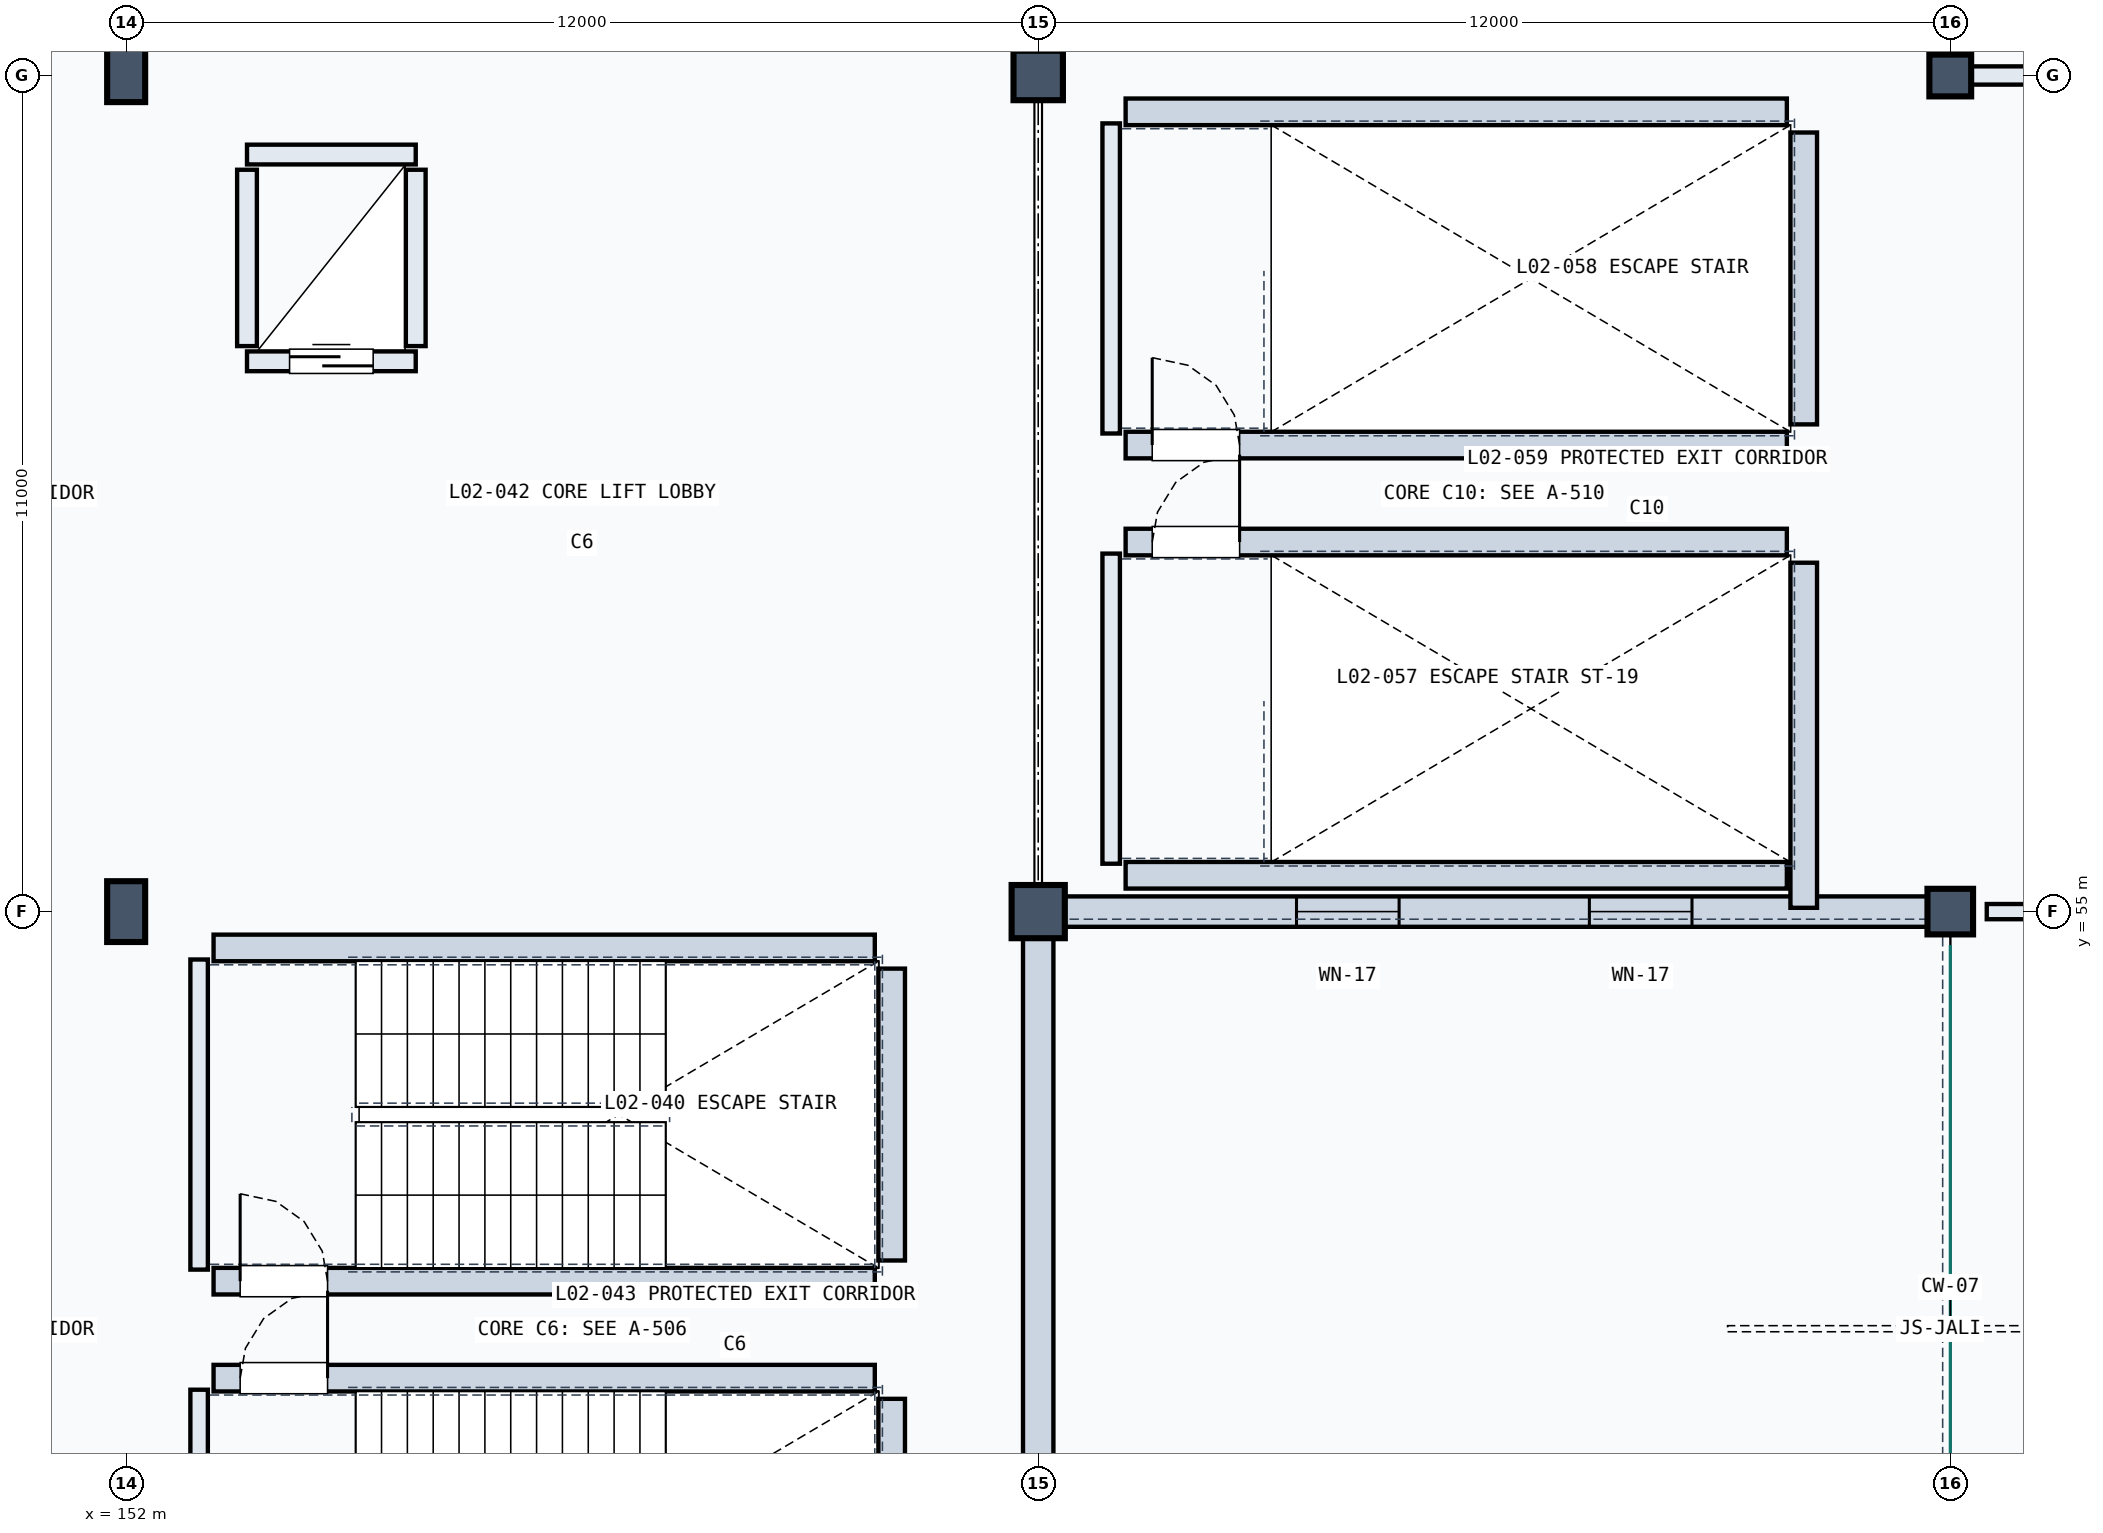
"""IFC4 building model, lengths in metres.
Left out: names, types, materials, properties, quantities, classifications, styles, units other than length and angle.
Written with IfcOpenShell. Run it as: python <this file> out.ifc"""

import sys

from ifc_helpers import new_model, si_unit, direction, frame, frame_2d, origin, origin_2d, place, context, subcontext, project, spatial, rectangle, extrude, element, fill, save


model = new_model("IFC4")
c1 = context("Model", 3, precision=1e-05, world=origin(), true_north=direction((0.0, 1.0)))
c2 = subcontext(c1, "Body", "Model", "MODEL_VIEW")
j1 = project(units=[si_unit("LENGTHUNIT", "METRE"), si_unit("PLANEANGLEUNIT", "RADIAN")], contexts=[c1])
p1 = place(None, origin())
s1 = spatial("IfcSite", under=j1, at=p1, CompositionType="ELEMENT")
p2 = place(p1, origin())
s2 = spatial("IfcBuilding", under=s1, at=p2, CompositionType="ELEMENT")
p3 = place(p2, frame((0.0, 0.0, 10.2)))
s3 = spatial("IfcBuildingStorey", under=s2, at=p3, CompositionType="ELEMENT", Elevation=10.2)
p4 = place(p3, frame((152.0, 55.0, 0.0), z_axis=(0.0, 0.0, 1.0), x_axis=(1.0, 0.0, 0.0)))
e1 = element("IfcColumn", 1, at=p4, inside=s3, PredefinedType="COLUMN", context=c2, shape_type="SweptSolid", body=[
    extrude(rectangle(XDim=0.5, YDim=0.8, at=origin_2d()), origin(), (0.0, 0.0, 1.0), 4.5),
])
p5 = place(p3, frame((152.0, 66.0, 0.0), z_axis=(0.0, 0.0, 1.0), x_axis=(1.0, 0.0, 0.0)))
e2 = element("IfcColumn", 2, at=p5, inside=s3, PredefinedType="COLUMN", context=c2, shape_type="SweptSolid", body=[
    extrude(rectangle(XDim=0.5, YDim=0.7, at=origin_2d()), origin(), (0.0, 0.0, 1.0), 4.5),
])
p6 = place(p3, frame((164.0, 55.0, 0.0), z_axis=(0.0, 0.0, 1.0), x_axis=(1.0, 0.0, 0.0)))
e3 = element("IfcColumn", 3, at=p6, inside=s3, PredefinedType="COLUMN", context=c2, shape_type="SweptSolid", body=[
    extrude(rectangle(XDim=0.7, YDim=0.7, at=origin_2d()), origin(), (0.0, 0.0, 1.0), 4.5),
])
p7 = place(p3, frame((164.0, 66.0, 0.0), z_axis=(0.0, 0.0, 1.0), x_axis=(1.0, 0.0, 0.0)))
e4 = element("IfcColumn", 4, at=p7, inside=s3, PredefinedType="COLUMN", context=c2, shape_type="SweptSolid", body=[
    extrude(rectangle(XDim=0.65, YDim=0.65, at=origin_2d()), origin(), (0.0, 0.0, 1.0), 4.5),
])
p8 = place(p3, frame((176.0, 55.0, 0.0), z_axis=(0.0, 0.0, 1.0), x_axis=(1.0, 0.0, 0.0)))
e5 = element("IfcColumn", 5, at=p8, inside=s3, PredefinedType="COLUMN", context=c2, shape_type="SweptSolid", body=[
    extrude(rectangle(XDim=0.6, YDim=0.6, at=origin_2d()), origin(), (0.0, 0.0, 1.0), 4.5),
])
p9 = place(p3, frame((176.0, 66.0, 0.0), z_axis=(0.0, 0.0, 1.0), x_axis=(1.0, 0.0, 0.0)))
e6 = element("IfcColumn", 6, at=p9, inside=s3, PredefinedType="COLUMN", context=c2, shape_type="SweptSolid", body=[
    extrude(rectangle(XDim=0.55, YDim=0.55, at=origin_2d()), origin(), (0.0, 0.0, 1.0), 4.5),
])
p10 = place(p3, frame((164.0, 44.22, 0.0), z_axis=(0.0, 0.0, 1.0), x_axis=(0.0, 1.0, 0.0)))
e7 = element("IfcWall", 7, at=p10, inside=s3, PredefinedType="SOLIDWALL", context=c2, shape_type="SweptSolid", body=[
    extrude(rectangle(XDim=10.56, YDim=0.4, at=frame_2d((5.28, 0.0))), origin(), (0.0, 0.0, 1.0), 3.19),
])
p11 = place(p3, frame((164.22, 55.0, 0.0), z_axis=(0.0, 0.0, 1.0), x_axis=(1.0, 0.0, 0.0)))
e8 = element("IfcWall", 8, at=p11, inside=s3, PredefinedType="SOLIDWALL", context=c2, shape_type="SweptSolid", body=[
    extrude(rectangle(XDim=11.56, YDim=0.4, at=frame_2d((5.78, 0.0))), origin(), (0.0, 0.0, 1.0), 3.29),
])
p12 = place(p11, frame((3.178, 0.0, 0.8)))
e9 = element("IfcOpeningElement", 9, at=p12, cuts=e8, PredefinedType="OPENING", context=c2, shape_type="SweptSolid", body=[
    extrude(rectangle(XDim=1.35, YDim=2.1, at=frame_2d((0.675, 1.05))), frame((0.0, 0.21, 0.0), z_axis=(0.0, -1.0, 0.0), x_axis=(1.0, 0.0, 0.0)), (0.0, 0.0, 1.0), 0.42),
])
p13 = place(p11, frame((7.032, 0.0, 0.8)))
e10 = element("IfcOpeningElement", 10, at=p13, cuts=e8, PredefinedType="OPENING", context=c2, shape_type="SweptSolid", body=[
    extrude(rectangle(XDim=1.35, YDim=2.1, at=frame_2d((0.675, 1.05))), frame((0.0, 0.21, 0.0), z_axis=(0.0, -1.0, 0.0), x_axis=(1.0, 0.0, 0.0)), (0.0, 0.0, 1.0), 0.42),
])
p14 = place(p3, frame((152.96, 44.63, 0.0), z_axis=(0.0, 0.0, 1.0), x_axis=(0.0, 1.0, 0.0)))
e11 = element("IfcWall", 11, at=p14, inside=s3, PredefinedType="SOLIDWALL", context=c2, shape_type="SweptSolid", body=[
    extrude(rectangle(XDim=4.08, YDim=0.23, at=frame_2d((2.04, 0.0))), origin(), (0.0, 0.0, 1.0), 4.14),
])
p15 = place(p3, frame((162.072, 44.05, 0.0), z_axis=(0.0, 0.0, 1.0), x_axis=(0.0, 1.0, 0.0)))
e12 = element("IfcWall", 12, at=p15, inside=s3, PredefinedType="SOLIDWALL", context=c2, shape_type="SweptSolid", body=[
    extrude(rectangle(XDim=4.54, YDim=0.35, at=frame_2d((2.27, 0.0))), origin(), (0.0, 0.0, 1.0), 4.14),
])
p16 = place(p3, frame((153.15, 48.862, 0.0), z_axis=(0.0, 0.0, 1.0), x_axis=(1.0, 0.0, 0.0)))
e13 = element("IfcWall", 13, at=p16, inside=s3, PredefinedType="SOLIDWALL", context=c2, shape_type="SweptSolid", body=[
    extrude(rectangle(XDim=8.7, YDim=0.35, at=frame_2d((4.35, 0.0))), origin(), (0.0, 0.0, 1.0), 4.14),
])
p17 = place(p16, frame((0.35, 0.0, 0.0)))
e14 = element("IfcOpeningElement", 14, at=p17, cuts=e13, PredefinedType="OPENING", context=c2, shape_type="SweptSolid", body=[
    extrude(rectangle(XDim=1.15, YDim=2.2, at=frame_2d((0.575, 1.1))), frame((0.0, 0.185, 0.0), z_axis=(0.0, -1.0, 0.0), x_axis=(1.0, 0.0, 0.0)), (0.0, 0.0, 1.0), 0.37),
])
p18 = place(p3, frame((152.96, 50.29, 0.0), z_axis=(0.0, 0.0, 1.0), x_axis=(0.0, 1.0, 0.0)))
e15 = element("IfcWall", 15, at=p18, inside=s3, PredefinedType="SOLIDWALL", context=c2, shape_type="SweptSolid", body=[
    extrude(rectangle(XDim=4.08, YDim=0.23, at=frame_2d((2.04, 0.0))), origin(), (0.0, 0.0, 1.0), 4.14),
])
p19 = place(p3, frame((162.072, 50.41, 0.0), z_axis=(0.0, 0.0, 1.0), x_axis=(0.0, 1.0, 0.0)))
e16 = element("IfcWall", 16, at=p19, inside=s3, PredefinedType="SOLIDWALL", context=c2, shape_type="SweptSolid", body=[
    extrude(rectangle(XDim=3.84, YDim=0.35, at=frame_2d((1.92, 0.0))), origin(), (0.0, 0.0, 1.0), 4.14),
])
p20 = place(p3, frame((153.15, 50.138, 0.0), z_axis=(0.0, 0.0, 1.0), x_axis=(1.0, 0.0, 0.0)))
e17 = element("IfcWall", 17, at=p20, inside=s3, PredefinedType="SOLIDWALL", context=c2, shape_type="SweptSolid", body=[
    extrude(rectangle(XDim=8.7, YDim=0.35, at=frame_2d((4.35, 0.0))), origin(), (0.0, 0.0, 1.0), 4.14),
])
p21 = place(p20, frame((0.35, 0.0, 0.0)))
e18 = element("IfcOpeningElement", 18, at=p21, cuts=e17, PredefinedType="OPENING", context=c2, shape_type="SweptSolid", body=[
    extrude(rectangle(XDim=1.15, YDim=2.2, at=frame_2d((0.575, 1.1))), frame((0.0, 0.185, 0.0), z_axis=(0.0, -1.0, 0.0), x_axis=(1.0, 0.0, 0.0)), (0.0, 0.0, 1.0), 0.37),
])
p22 = place(p3, frame((153.15, 54.522, 0.0), z_axis=(0.0, 0.0, 1.0), x_axis=(1.0, 0.0, 0.0)))
e19 = element("IfcWall", 19, at=p22, inside=s3, PredefinedType="SOLIDWALL", context=c2, shape_type="SweptSolid", body=[
    extrude(rectangle(XDim=8.7, YDim=0.35, at=frame_2d((4.35, 0.0))), origin(), (0.0, 0.0, 1.0), 4.14),
])
p23 = place(p3, frame((153.59, 62.24, 0.0), z_axis=(0.0, 0.0, 1.0), x_axis=(1.0, 0.0, 0.0)))
e20 = element("IfcWall", 20, at=p23, inside=s3, PredefinedType="SOLIDWALL", context=c2, shape_type="SweptSolid", body=[
    extrude(rectangle(XDim=2.22, YDim=0.26, at=frame_2d((1.11, 0.0))), origin(), (0.0, 0.0, 1.0), 4.14),
])
p24 = place(p23, frame((0.56, 0.0, 0.0)))
e21 = element("IfcOpeningElement", 21, at=p24, cuts=e20, PredefinedType="OPENING", context=c2, shape_type="SweptSolid", body=[
    extrude(rectangle(XDim=1.1, YDim=2.15, at=frame_2d((0.55, 1.075))), frame((0.0, 0.14, 0.0), z_axis=(0.0, -1.0, 0.0), x_axis=(1.0, 0.0, 0.0)), (0.0, 0.0, 1.0), 0.28),
])
p25 = place(p3, frame((153.59, 64.96, 0.0), z_axis=(0.0, 0.0, 1.0), x_axis=(1.0, 0.0, 0.0)))
e22 = element("IfcWall", 22, at=p25, inside=s3, PredefinedType="SOLIDWALL", context=c2, shape_type="SweptSolid", body=[
    extrude(rectangle(XDim=2.22, YDim=0.26, at=frame_2d((1.11, 0.0))), origin(), (0.0, 0.0, 1.0), 4.14),
])
for number, where, z_axis, x_axis in (
    (23, (153.59, 62.44, 0.0), (0.0, 0.0, 1.0), (0.0, 1.0, 0.0)),
    (24, (155.81, 62.44, 0.0), (0.0, 0.0, 1.0), (0.0, 1.0, 0.0)),
):
    element("IfcWall", number, at=place(p3, frame(where, z_axis=z_axis, x_axis=x_axis)), inside=s3, PredefinedType="SOLIDWALL", context=c2, shape_type="SweptSolid", body=[
        extrude(rectangle(XDim=2.32, YDim=0.26, at=frame_2d((1.16, 0.0))), origin(), (0.0, 0.0, 1.0), 4.14),
    ])
p26 = place(p3, frame((164.96, 55.63, 0.0), z_axis=(0.0, 0.0, 1.0), x_axis=(0.0, 1.0, 0.0)))
e25 = element("IfcWall", 25, at=p26, inside=s3, PredefinedType="SOLIDWALL", context=c2, shape_type="SweptSolid", body=[
    extrude(rectangle(XDim=4.08, YDim=0.23, at=frame_2d((2.04, 0.0))), origin(), (0.0, 0.0, 1.0), 4.14),
])
p27 = place(p3, frame((174.072, 55.05, 0.0), z_axis=(0.0, 0.0, 1.0), x_axis=(0.0, 1.0, 0.0)))
e26 = element("IfcWall", 26, at=p27, inside=s3, PredefinedType="SOLIDWALL", context=c2, shape_type="SweptSolid", body=[
    extrude(rectangle(XDim=4.54, YDim=0.35, at=frame_2d((2.27, 0.0))), origin(), (0.0, 0.0, 1.0), 4.14),
])
p28 = place(p3, frame((165.15, 55.478, 0.0), z_axis=(0.0, 0.0, 1.0), x_axis=(1.0, 0.0, 0.0)))
e27 = element("IfcWall", 27, at=p28, inside=s3, PredefinedType="SOLIDWALL", context=c2, shape_type="SweptSolid", body=[
    extrude(rectangle(XDim=8.7, YDim=0.35, at=frame_2d((4.35, 0.0))), origin(), (0.0, 0.0, 1.0), 4.14),
])
p29 = place(p3, frame((165.15, 59.862, 0.0), z_axis=(0.0, 0.0, 1.0), x_axis=(1.0, 0.0, 0.0)))
e28 = element("IfcWall", 28, at=p29, inside=s3, PredefinedType="SOLIDWALL", context=c2, shape_type="SweptSolid", body=[
    extrude(rectangle(XDim=8.7, YDim=0.35, at=frame_2d((4.35, 0.0))), origin(), (0.0, 0.0, 1.0), 4.14),
])
p30 = place(p29, frame((0.35, 0.0, 0.0)))
e29 = element("IfcOpeningElement", 29, at=p30, cuts=e28, PredefinedType="OPENING", context=c2, shape_type="SweptSolid", body=[
    extrude(rectangle(XDim=1.15, YDim=2.2, at=frame_2d((0.575, 1.1))), frame((0.0, 0.185, 0.0), z_axis=(0.0, -1.0, 0.0), x_axis=(1.0, 0.0, 0.0)), (0.0, 0.0, 1.0), 0.37),
])
p31 = place(p3, frame((164.96, 61.29, 0.0), z_axis=(0.0, 0.0, 1.0), x_axis=(0.0, 1.0, 0.0)))
e30 = element("IfcWall", 30, at=p31, inside=s3, PredefinedType="SOLIDWALL", context=c2, shape_type="SweptSolid", body=[
    extrude(rectangle(XDim=4.08, YDim=0.23, at=frame_2d((2.04, 0.0))), origin(), (0.0, 0.0, 1.0), 4.14),
])
p32 = place(p3, frame((174.072, 61.41, 0.0), z_axis=(0.0, 0.0, 1.0), x_axis=(0.0, 1.0, 0.0)))
e31 = element("IfcWall", 31, at=p32, inside=s3, PredefinedType="SOLIDWALL", context=c2, shape_type="SweptSolid", body=[
    extrude(rectangle(XDim=3.84, YDim=0.35, at=frame_2d((1.92, 0.0))), origin(), (0.0, 0.0, 1.0), 4.14),
])
p33 = place(p3, frame((165.15, 61.138, 0.0), z_axis=(0.0, 0.0, 1.0), x_axis=(1.0, 0.0, 0.0)))
e32 = element("IfcWall", 32, at=p33, inside=s3, PredefinedType="SOLIDWALL", context=c2, shape_type="SweptSolid", body=[
    extrude(rectangle(XDim=8.7, YDim=0.35, at=frame_2d((4.35, 0.0))), origin(), (0.0, 0.0, 1.0), 4.14),
])
p34 = place(p33, frame((0.35, 0.0, 0.0)))
e33 = element("IfcOpeningElement", 33, at=p34, cuts=e32, PredefinedType="OPENING", context=c2, shape_type="SweptSolid", body=[
    extrude(rectangle(XDim=1.15, YDim=2.2, at=frame_2d((0.575, 1.1))), frame((0.0, 0.185, 0.0), z_axis=(0.0, -1.0, 0.0), x_axis=(1.0, 0.0, 0.0)), (0.0, 0.0, 1.0), 0.37),
])
p35 = place(p3, frame((165.15, 65.522, 0.0), z_axis=(0.0, 0.0, 1.0), x_axis=(1.0, 0.0, 0.0)))
e34 = element("IfcWall", 34, at=p35, inside=s3, PredefinedType="SOLIDWALL", context=c2, shape_type="SweptSolid", body=[
    extrude(rectangle(XDim=8.7, YDim=0.35, at=frame_2d((4.35, 0.0))), origin(), (0.0, 0.0, 1.0), 4.14),
])
p36 = place(p3, frame((176.48, 55.0, 0.0), z_axis=(0.0, 0.0, 1.0), x_axis=(1.0, 0.0, 0.0)))
e35 = element("IfcWall", 35, at=p36, inside=s3, PredefinedType="PARTITIONING", context=c2, shape_type="SweptSolid", body=[
    extrude(rectangle(XDim=10.04, YDim=0.2, at=frame_2d((5.02, 0.0))), origin(), (0.0, 0.0, 1.0), 4.14),
])
p37 = place(p36, frame((4.55, 0.0, 0.0)))
e36 = element("IfcOpeningElement", 36, at=p37, cuts=e35, PredefinedType="OPENING", context=c2, shape_type="SweptSolid", body=[
    extrude(rectangle(XDim=0.94, YDim=2.15, at=frame_2d((0.47, 1.075))), frame((0.0, 0.11, 0.0), z_axis=(0.0, -1.0, 0.0), x_axis=(1.0, 0.0, 0.0)), (0.0, 0.0, 1.0), 0.22),
])
p38 = place(p3, frame((176.22, 66.0, 0.0), z_axis=(0.0, 0.0, 1.0), x_axis=(1.0, 0.0, 0.0)))
e37 = element("IfcWall", 37, at=p38, inside=s3, PredefinedType="PARTITIONING", context=c2, shape_type="SweptSolid", body=[
    extrude(rectangle(XDim=10.3, YDim=0.24, at=frame_2d((5.15, 0.0))), origin(), (0.0, 0.0, 1.0), 4.14),
])
p39 = place(p12, origin())
e38 = element("IfcWindow", 38, at=p39, inside=s3, PartitioningType="SINGLE_PANEL", PredefinedType="WINDOW", context=c2, shape_type="SweptSolid", body=[
    extrude(rectangle(XDim=1.35, YDim=2.1, at=frame_2d((0.675, 1.05))), frame((0.0, 0.03, 0.0), z_axis=(0.0, -1.0, 0.0), x_axis=(1.0, 0.0, 0.0)), (0.0, 0.0, 1.0), 0.06),
])
fill(e9, e38)
p40 = place(p13, origin())
e39 = element("IfcWindow", 39, at=p40, inside=s3, PartitioningType="SINGLE_PANEL", PredefinedType="WINDOW", context=c2, shape_type="SweptSolid", body=[
    extrude(rectangle(XDim=1.35, YDim=2.1, at=frame_2d((0.675, 1.05))), frame((0.0, 0.03, 0.0), z_axis=(0.0, -1.0, 0.0), x_axis=(1.0, 0.0, 0.0)), (0.0, 0.0, 1.0), 0.06),
])
fill(e10, e39)
p41 = place(p17, origin())
e40 = element("IfcDoor", 40, at=p41, inside=s3, OperationType="SINGLE_SWING_RIGHT", PredefinedType="DOOR", context=c2, shape_type="SweptSolid", body=[
    extrude(rectangle(XDim=1.15, YDim=2.2, at=frame_2d((0.575, 1.1))), frame((0.0, 0.025, 0.0), z_axis=(0.0, -1.0, 0.0), x_axis=(1.0, 0.0, 0.0)), (0.0, 0.0, 1.0), 0.05),
])
fill(e14, e40)
p42 = place(p21, origin())
e41 = element("IfcDoor", 41, at=p42, inside=s3, OperationType="SINGLE_SWING_LEFT", PredefinedType="DOOR", context=c2, shape_type="SweptSolid", body=[
    extrude(rectangle(XDim=1.15, YDim=2.2, at=frame_2d((0.575, 1.1))), frame((0.0, 0.025, 0.0), z_axis=(0.0, -1.0, 0.0), x_axis=(1.0, 0.0, 0.0)), (0.0, 0.0, 1.0), 0.05),
])
fill(e18, e41)
p43 = place(p24, origin())
e42 = element("IfcDoor", 42, at=p43, inside=s3, OperationType="SLIDING_TO_LEFT", PredefinedType="DOOR", context=c2, shape_type="SweptSolid", body=[
    extrude(rectangle(XDim=1.1, YDim=2.15, at=frame_2d((0.55, 1.075))), frame((0.0, 0.025, 0.0), z_axis=(0.0, -1.0, 0.0), x_axis=(1.0, 0.0, 0.0)), (0.0, 0.0, 1.0), 0.05),
])
fill(e21, e42)
p44 = place(p30, origin())
e43 = element("IfcDoor", 43, at=p44, inside=s3, OperationType="SINGLE_SWING_RIGHT", PredefinedType="DOOR", context=c2, shape_type="SweptSolid", body=[
    extrude(rectangle(XDim=1.15, YDim=2.2, at=frame_2d((0.575, 1.1))), frame((0.0, 0.025, 0.0), z_axis=(0.0, -1.0, 0.0), x_axis=(1.0, 0.0, 0.0)), (0.0, 0.0, 1.0), 0.05),
])
fill(e29, e43)
p45 = place(p34, origin())
e44 = element("IfcDoor", 44, at=p45, inside=s3, OperationType="SINGLE_SWING_LEFT", PredefinedType="DOOR", context=c2, shape_type="SweptSolid", body=[
    extrude(rectangle(XDim=1.15, YDim=2.2, at=frame_2d((0.575, 1.1))), frame((0.0, 0.025, 0.0), z_axis=(0.0, -1.0, 0.0), x_axis=(1.0, 0.0, 0.0)), (0.0, 0.0, 1.0), 0.05),
])
fill(e33, e44)
save(model, sys.argv[1])
